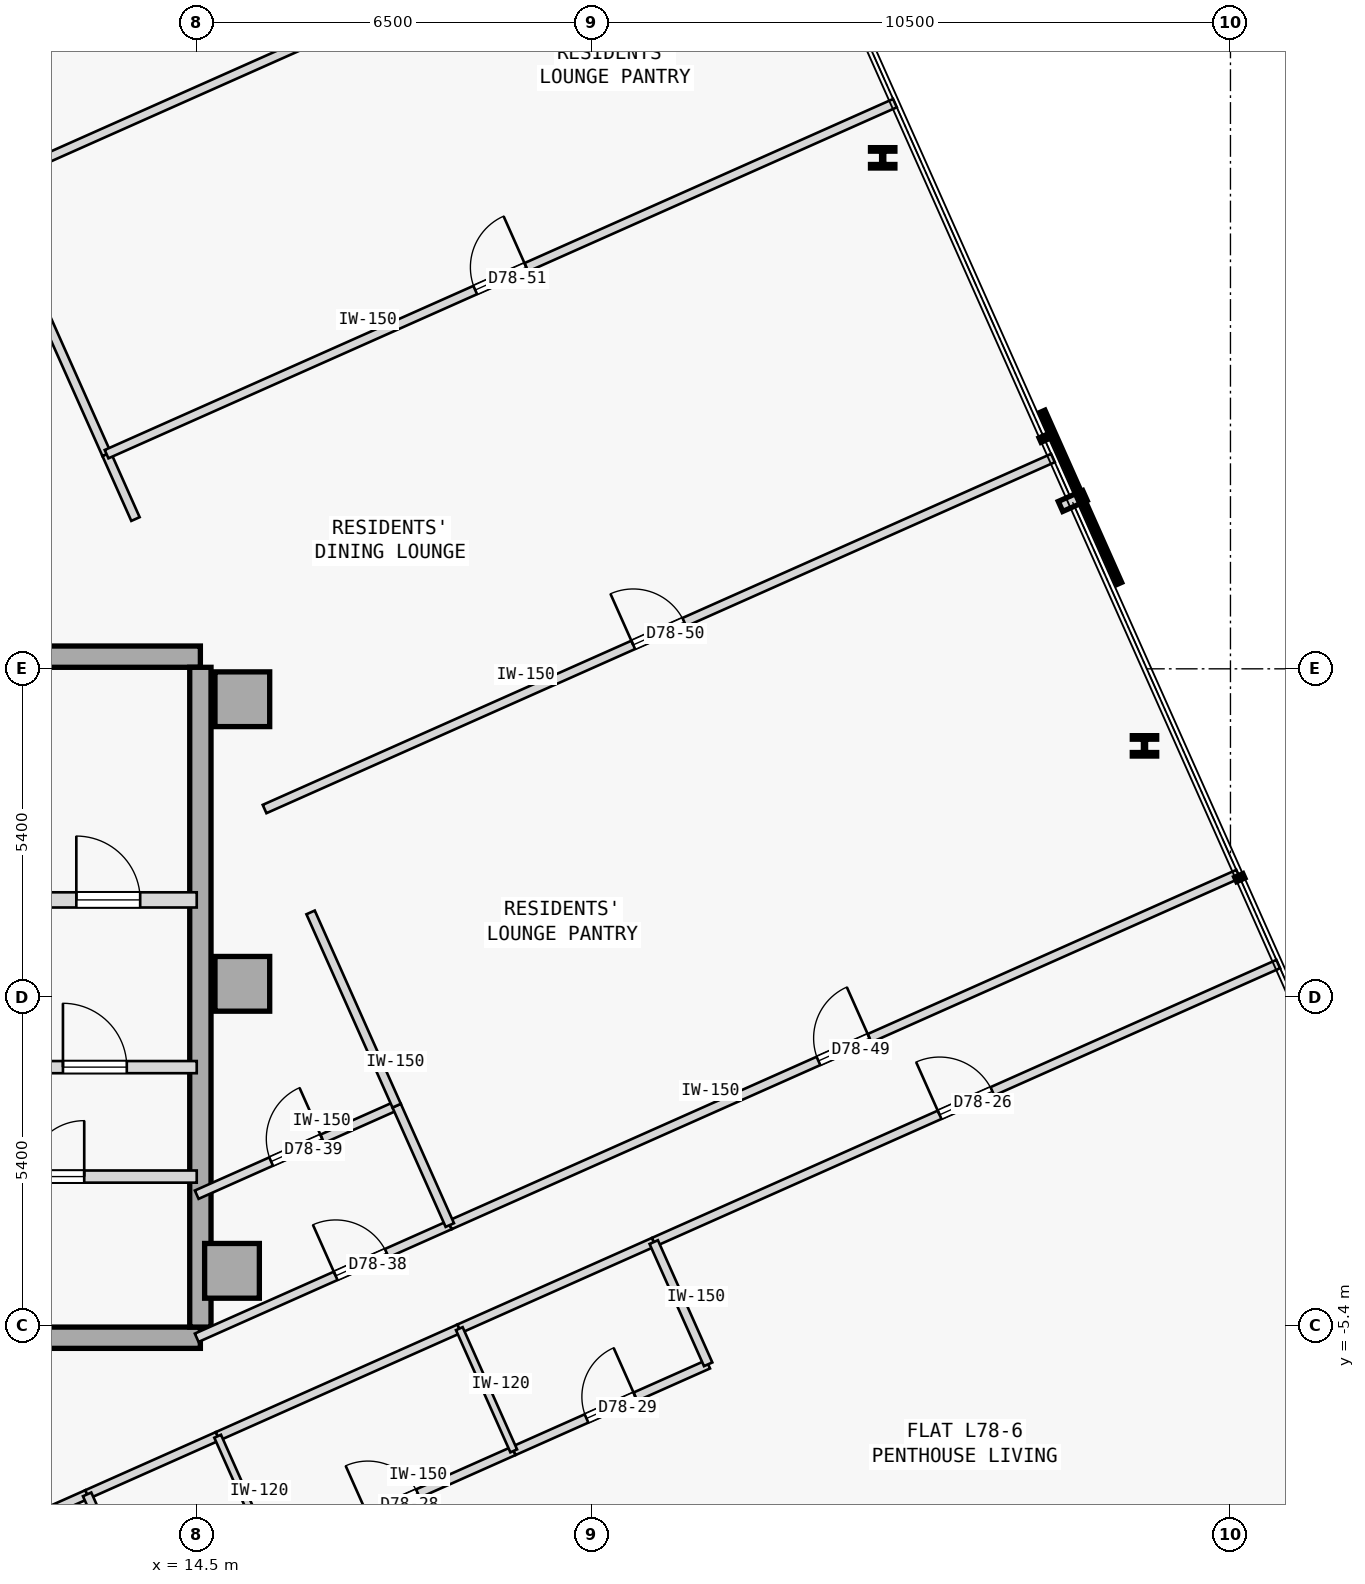
"""IFC4 building model, lengths in metres.
Left out: names, types, materials, properties, quantities, classifications, styles, units other than length and angle.
Written with IfcOpenShell. Run it as: python <this file> out.ifc"""

import sys

from ifc_helpers import new_model, si_unit, direction, frame, frame_2d, origin, origin_2d, place, context, subcontext, project, spatial, rectangle, i_section, extrude, element, fill, save


model = new_model("IFC4")
c1 = context("Model", 3, precision=1e-05, world=origin(), true_north=direction((0.0, 1.0)))
c2 = subcontext(c1, "Body", "Model", "MODEL_VIEW")
j1 = project(units=[si_unit("LENGTHUNIT", "METRE"), si_unit("PLANEANGLEUNIT", "RADIAN")], contexts=[c1])
p1 = place(None, origin())
s1 = spatial("IfcSite", under=j1, at=p1, CompositionType="ELEMENT")
p2 = place(p1, origin())
s2 = spatial("IfcBuilding", under=s1, at=p2, CompositionType="ELEMENT")
p3 = place(p2, frame((0.0, 0.0, 291.95)))
s3 = spatial("IfcBuildingStorey", under=s2, at=p3, CompositionType="ELEMENT", Elevation=291.95)
for number, where, z_axis, x_axis in (
    (1, (15.25, 4.9, 0.0), (0.0, 0.0, 1.0), (1.0, 0.0, 0.0)),
    (2, (15.25, 0.22, 0.0), (0.0, 0.0, 1.0), (1.0, 0.0, 0.0)),
    (3, (15.08, -4.5, 0.0), (0.0, 0.0, 1.0), (1.0, 0.0, 0.0)),
):
    element("IfcColumn", number, at=place(p3, frame(where, z_axis=z_axis, x_axis=x_axis)), inside=s3, PredefinedType="COLUMN", context=c2, shape_type="SweptSolid", body=[
        extrude(rectangle(XDim=0.9, YDim=0.9, at=origin_2d()), origin(), (0.0, 0.0, 1.0), 3.35),
    ])
p4 = place(p3, frame((3.15, 5.6, 0.0), z_axis=(0.0, 0.0, 1.0), x_axis=(1.0, 0.0, 0.0)))
e4 = element("IfcWall", 4, at=p4, inside=s3, PredefinedType="SHEAR", context=c2, shape_type="SweptSolid", body=[
    extrude(rectangle(XDim=11.41, YDim=0.35, at=frame_2d((5.705, 0.0))), origin(), (0.0, 0.0, 1.0), 3.125),
])
p5 = place(p3, frame((3.7, -5.6, 0.0), z_axis=(0.0, 0.0, 1.0), x_axis=(1.0, 0.0, 0.0)))
e5 = element("IfcWall", 5, at=p5, inside=s3, PredefinedType="SHEAR", context=c2, shape_type="SweptSolid", body=[
    extrude(rectangle(XDim=10.86, YDim=0.35, at=frame_2d((5.43, 0.0))), origin(), (0.0, 0.0, 1.0), 3.125),
])
p6 = place(p3, frame((14.56, -5.425, 0.0), z_axis=(0.0, 0.0, 1.0), x_axis=(0.0, 1.0, 0.0)))
e6 = element("IfcWall", 6, at=p6, inside=s3, PredefinedType="SHEAR", context=c2, shape_type="SweptSolid", body=[
    extrude(rectangle(XDim=10.85, YDim=0.35, at=frame_2d((5.425, 0.0))), origin(), (0.0, 0.0, 1.0), 3.125),
])
for number, where, z_axis, x_axis in (
    (7, (30.086, 4.133, 0.0), (0.0, 0.0, 1.0), (1.0, 0.0, 0.0)),
    (8, (25.781, 13.803, 0.0), (0.0, 0.0, 1.0), (1.0, 0.0, 0.0)),
):
    element("IfcColumn", number, at=place(p3, frame(where, z_axis=z_axis, x_axis=x_axis)), inside=s3, PredefinedType="COLUMN", context=c2, shape_type="SweptSolid", body=[
        extrude(i_section(OverallWidth=0.401, OverallDepth=0.335, WebThickness=0.036, FlangeThickness=0.058, FilletRadius=0.015, at=origin_2d()), origin(), (0.0, 0.0, 1.0), 3.35),
    ])
p7 = place(p3, frame((10.9, 1.6, 0.0), z_axis=(0.0, 0.0, 1.0), x_axis=(1.0, 0.0, 0.0)))
e9 = element("IfcWall", 9, at=p7, inside=s3, PredefinedType="STANDARD", context=c2, shape_type="SweptSolid", body=[
    extrude(rectangle(XDim=3.6, YDim=0.25, at=frame_2d((1.8, 0.0))), origin(), (0.0, 0.0, 1.0), 3.125),
])
p8 = place(p7, frame((1.62, 0.0, 0.0)))
e10 = element("IfcOpeningElement", 10, at=p8, cuts=e9, PredefinedType="OPENING", context=c2, shape_type="SweptSolid", body=[
    extrude(rectangle(XDim=1.05, YDim=2.15, at=frame_2d((0.525, 1.075))), frame((0.0, 0.135, 0.0), z_axis=(0.0, -1.0, 0.0), x_axis=(1.0, 0.0, 0.0)), (0.0, 0.0, 1.0), 0.27),
])
p9 = place(p3, frame((11.55, -1.15, 0.0), z_axis=(0.0, 0.0, 1.0), x_axis=(1.0, 0.0, 0.0)))
e11 = element("IfcWall", 11, at=p9, inside=s3, PredefinedType="STANDARD", context=c2, shape_type="SweptSolid", body=[
    extrude(rectangle(XDim=2.95, YDim=0.2, at=frame_2d((1.475, 0.0))), origin(), (0.0, 0.0, 1.0), 3.125),
])
p10 = place(p9, frame((0.75, 0.0, 0.0)))
e12 = element("IfcOpeningElement", 12, at=p10, cuts=e11, PredefinedType="OPENING", context=c2, shape_type="SweptSolid", body=[
    extrude(rectangle(XDim=1.05, YDim=2.18, at=frame_2d((0.525, 1.09))), frame((0.0, 0.11, 0.0), z_axis=(0.0, -1.0, 0.0), x_axis=(1.0, 0.0, 0.0)), (0.0, 0.0, 1.0), 0.22),
])
p11 = place(p3, frame((3.7, -2.95, 0.0), z_axis=(0.0, 0.0, 1.0), x_axis=(1.0, 0.0, 0.0)))
e13 = element("IfcWall", 13, at=p11, inside=s3, PredefinedType="STANDARD", context=c2, shape_type="SweptSolid", body=[
    extrude(rectangle(XDim=10.8, YDim=0.2, at=frame_2d((5.4, 0.0))), origin(), (0.0, 0.0, 1.0), 3.125),
])
p12 = place(p11, frame((0.53, 0.0, 0.0)))
e14 = element("IfcOpeningElement", 14, at=p12, cuts=e13, PredefinedType="OPENING", context=c2, shape_type="SweptSolid", body=[
    extrude(rectangle(XDim=1.1, YDim=2.15, at=frame_2d((0.55, 1.075))), frame((0.0, 0.11, 0.0), z_axis=(0.0, -1.0, 0.0), x_axis=(1.0, 0.0, 0.0)), (0.0, 0.0, 1.0), 0.22),
])
p13 = place(p11, frame((3.71, 0.0, 0.0)))
e15 = element("IfcOpeningElement", 15, at=p13, cuts=e13, PredefinedType="OPENING", context=c2, shape_type="SweptSolid", body=[
    extrude(rectangle(XDim=0.92, YDim=2.15, at=frame_2d((0.46, 1.075))), frame((0.0, 0.11, 0.0), z_axis=(0.0, -1.0, 0.0), x_axis=(1.0, 0.0, 0.0)), (0.0, 0.0, 1.0), 0.22),
])
p14 = place(p11, frame((8.03, 0.0, 0.0)))
e16 = element("IfcOpeningElement", 16, at=p14, cuts=e13, PredefinedType="OPENING", context=c2, shape_type="SweptSolid", body=[
    extrude(rectangle(XDim=0.92, YDim=2.15, at=frame_2d((0.46, 1.075))), frame((0.0, 0.11, 0.0), z_axis=(0.0, -1.0, 0.0), x_axis=(1.0, 0.0, 0.0)), (0.0, 0.0, 1.0), 0.22),
])
p15 = place(p3, frame((7.204, -10.622, 0.0), z_axis=(0.0, 0.0, 1.0), x_axis=(0.913545172627, 0.406737283231, 0.0)))
e17 = element("IfcWall", 17, at=p15, inside=s3, PredefinedType="PARTITIONING", context=c2, shape_type="SweptSolid", body=[
    extrude(rectangle(XDim=6.014, YDim=0.15, at=frame_2d((3.007, 0.0))), origin(), (0.0, 0.0, 1.0), 3.125),
])
p16 = place(p3, frame((22.016, -4.027, 0.0), z_axis=(0.0, 0.0, 1.0), x_axis=(0.913548968583, 0.406728757282, 0.0)))
e18 = element("IfcWall", 18, at=p16, inside=s3, PredefinedType="PARTITIONING", context=c2, shape_type="SweptSolid", body=[
    extrude(rectangle(XDim=11.242, YDim=0.15, at=frame_2d((5.621, 0.0))), origin(), (0.0, 0.0, 1.0), 3.125),
])
p17 = place(p16, frame((5.146, 0.0, 0.0)))
e19 = element("IfcOpeningElement", 19, at=p17, cuts=e18, PredefinedType="OPENING", context=c2, shape_type="SweptSolid", body=[
    extrude(rectangle(XDim=0.95, YDim=2.15, at=frame_2d((0.475, 1.075))), frame((0.0, 0.085, 0.0), z_axis=(0.0, -1.0, 0.0), x_axis=(1.0, 0.0, 0.0)), (0.0, 0.0, 1.0), 0.17),
])
p18 = place(p3, frame((12.698, -8.176, 0.0), z_axis=(0.0, 0.0, 1.0), x_axis=(0.913558622212, 0.406707073682, 0.0)))
e20 = element("IfcWall", 20, at=p18, inside=s3, PredefinedType="PARTITIONING", context=c2, shape_type="SweptSolid", body=[
    extrude(rectangle(XDim=2.35, YDim=0.15, at=frame_2d((1.175, 0.0))), origin(), (0.0, 0.0, 1.0), 3.125),
])
p19 = place(p3, frame((14.844, -7.22, 0.0), z_axis=(0.0, 0.0, 1.0), x_axis=(0.913524337797, 0.406784075711, 0.0)))
e21 = element("IfcWall", 21, at=p19, inside=s3, PredefinedType="PARTITIONING", context=c2, shape_type="SweptSolid", body=[
    extrude(rectangle(XDim=4.35, YDim=0.15, at=frame_2d((2.175, 0.0))), origin(), (0.0, 0.0, 1.0), 3.125),
])
p20 = place(p3, frame((18.818, -5.451, 0.0), z_axis=(0.0, 0.0, 1.0), x_axis=(0.913538066796, 0.406753242783, 0.0)))
e22 = element("IfcWall", 22, at=p20, inside=s3, PredefinedType="PARTITIONING", context=c2, shape_type="SweptSolid", body=[
    extrude(rectangle(XDim=3.5, YDim=0.15, at=frame_2d((1.75, 0.0))), origin(), (0.0, 0.0, 1.0), 3.125),
])
p21 = place(p3, frame((14.5, -5.6, 0.0), z_axis=(0.0, 0.0, 1.0), x_axis=(0.913550607208, 0.406725076766, 0.0)))
e23 = element("IfcWall", 23, at=p21, inside=s3, PredefinedType="PARTITIONING", context=c2, shape_type="SweptSolid", body=[
    extrude(rectangle(XDim=4.556, YDim=0.15, at=frame_2d((2.278, 0.0))), origin(), (0.0, 0.0, 1.0), 3.125),
])
p22 = place(p21, frame((2.501, 0.0, 0.0)))
e24 = element("IfcOpeningElement", 24, at=p22, cuts=e23, PredefinedType="OPENING", context=c2, shape_type="SweptSolid", body=[
    extrude(rectangle(XDim=0.92, YDim=2.15, at=frame_2d((0.46, 1.075))), frame((0.0, 0.085, 0.0), z_axis=(0.0, -1.0, 0.0), x_axis=(1.0, 0.0, 0.0)), (0.0, 0.0, 1.0), 0.17),
])
p23 = place(p3, frame((18.662, -3.747, 0.0), z_axis=(0.0, 0.0, 1.0), x_axis=(0.913544622417, 0.406738519018, 0.0)))
e25 = element("IfcWall", 25, at=p23, inside=s3, PredefinedType="PARTITIONING", context=c2, shape_type="SweptSolid", body=[
    extrude(rectangle(XDim=14.192, YDim=0.15, at=frame_2d((7.096, 0.0))), origin(), (0.0, 0.0, 1.0), 3.125),
])
p24 = place(p23, frame((6.636, 0.0, 0.0)))
e26 = element("IfcOpeningElement", 26, at=p24, cuts=e25, PredefinedType="OPENING", context=c2, shape_type="SweptSolid", body=[
    extrude(rectangle(XDim=0.92, YDim=2.15, at=frame_2d((0.46, 1.075))), frame((0.0, 0.085, 0.0), z_axis=(0.0, -1.0, 0.0), x_axis=(1.0, 0.0, 0.0)), (0.0, 0.0, 1.0), 0.17),
])
p25 = place(p3, frame((13.592, -10.186, 0.0), z_axis=(0.0, 0.0, 1.0), x_axis=(-0.406725294076, 0.913550510459, 0.0)))
e27 = element("IfcWall", 27, at=p25, inside=s3, PredefinedType="PARTITIONING", context=c2, shape_type="SweptSolid", body=[
    extrude(rectangle(XDim=2.2, YDim=0.15, at=frame_2d((1.1, 0.0))), origin(), (0.0, 0.0, 1.0), 3.125),
])
p26 = place(p3, frame((15.739, -9.23, 0.0), z_axis=(0.0, 0.0, 1.0), x_axis=(0.913545193015, 0.406737237438, 0.0)))
e28 = element("IfcWall", 28, at=p26, inside=s3, PredefinedType="PARTITIONING", context=c2, shape_type="SweptSolid", body=[
    extrude(rectangle(XDim=4.35, YDim=0.15, at=frame_2d((2.175, 0.0))), origin(), (0.0, 0.0, 1.0), 3.125),
])
p27 = place(p26, frame((1.725, 0.0, 0.0)))
e29 = element("IfcOpeningElement", 29, at=p27, cuts=e28, PredefinedType="OPENING", context=c2, shape_type="SweptSolid", body=[
    extrude(rectangle(XDim=0.9, YDim=2.15, at=frame_2d((0.45, 1.075))), frame((0.0, 0.085, 0.0), z_axis=(0.0, -1.0, 0.0), x_axis=(1.0, 0.0, 0.0)), (0.0, 0.0, 1.0), 0.17),
])
p28 = place(p3, frame((19.713, -7.461, 0.0), z_axis=(0.0, 0.0, 1.0), x_axis=(0.913549606868, 0.406727323635, 0.0)))
e30 = element("IfcWall", 30, at=p28, inside=s3, PredefinedType="PARTITIONING", context=c2, shape_type="SweptSolid", body=[
    extrude(rectangle(XDim=3.5, YDim=0.15, at=frame_2d((1.75, 0.0))), origin(), (0.0, 0.0, 1.0), 3.125),
])
p29 = place(p28, frame((1.31, 0.0, 0.0)))
e31 = element("IfcOpeningElement", 31, at=p29, cuts=e30, PredefinedType="OPENING", context=c2, shape_type="SweptSolid", body=[
    extrude(rectangle(XDim=0.88, YDim=2.15, at=frame_2d((0.44, 1.075))), frame((0.0, 0.085, 0.0), z_axis=(0.0, -1.0, 0.0), x_axis=(1.0, 0.0, 0.0)), (0.0, 0.0, 1.0), 0.17),
])
p30 = place(p3, frame((22.911, -6.037, 0.0), z_axis=(0.0, 0.0, 1.0), x_axis=(-0.40677666873, 0.913527636022, 0.0)))
e32 = element("IfcWall", 32, at=p30, inside=s3, PredefinedType="PARTITIONING", context=c2, shape_type="SweptSolid", body=[
    extrude(rectangle(XDim=2.2, YDim=0.15, at=frame_2d((1.1, 0.0))), origin(), (0.0, 0.0, 1.0), 3.125),
])
p31 = place(p3, frame((15.739, -9.23, 0.0), z_axis=(0.0, 0.0, 1.0), x_axis=(-0.406725294076, 0.913550510459, 0.0)))
e33 = element("IfcWall", 33, at=p31, inside=s3, PredefinedType="PARTITIONING", context=c2, shape_type="SweptSolid", body=[
    extrude(rectangle(XDim=2.2, YDim=0.12, at=frame_2d((1.1, 0.0))), origin(), (0.0, 0.0, 1.0), 3.125),
])
p32 = place(p3, frame((19.713, -7.461, 0.0), z_axis=(0.0, 0.0, 1.0), x_axis=(-0.406684063321, 0.913568865845, 0.0)))
e34 = element("IfcWall", 34, at=p32, inside=s3, PredefinedType="PARTITIONING", context=c2, shape_type="SweptSolid", body=[
    extrude(rectangle(XDim=2.2, YDim=0.12, at=frame_2d((1.1, 0.0))), origin(), (0.0, 0.0, 1.0), 3.125),
])
p33 = place(p3, frame((14.5, -3.248, 0.0), z_axis=(0.0, 0.0, 1.0), x_axis=(0.913542803573, 0.40674260416, 0.0)))
e35 = element("IfcWall", 35, at=p33, inside=s3, PredefinedType="PARTITIONING", context=c2, shape_type="SweptSolid", body=[
    extrude(rectangle(XDim=3.599, YDim=0.15, at=frame_2d((1.8, 0.0))), origin(), (0.0, 0.0, 1.0), 3.125),
])
p34 = place(p33, frame((1.34, 0.0, 0.0)))
e36 = element("IfcOpeningElement", 36, at=p34, cuts=e35, PredefinedType="OPENING", context=c2, shape_type="SweptSolid", body=[
    extrude(rectangle(XDim=0.92, YDim=2.15, at=frame_2d((0.46, 1.075))), frame((0.0, 0.085, 0.0), z_axis=(0.0, -1.0, 0.0), x_axis=(1.0, 0.0, 0.0)), (0.0, 0.0, 1.0), 0.17),
])
p35 = place(p3, frame((18.662, -3.747, 0.0), z_axis=(0.0, 0.0, 1.0), x_axis=(-0.406686481677, 0.913567789286, 0.0)))
e37 = element("IfcWall", 37, at=p35, inside=s3, PredefinedType="PARTITIONING", context=c2, shape_type="SweptSolid", body=[
    extrude(rectangle(XDim=2.149, YDim=0.15, at=frame_2d((1.075, 0.0))), origin(), (0.0, 0.0, 1.0), 3.125),
])
p36 = place(p3, frame((17.788, -1.784, 0.0), z_axis=(0.0, 0.0, 1.0), x_axis=(-0.40673740295, 0.913545119324, 0.0)))
e38 = element("IfcWall", 38, at=p36, inside=s3, PredefinedType="PARTITIONING", context=c2, shape_type="SweptSolid", body=[
    extrude(rectangle(XDim=3.479, YDim=0.15, at=frame_2d((1.74, 0.0))), origin(), (0.0, 0.0, 1.0), 3.125),
])
p37 = place(p3, frame((13.493, 7.863, 0.0), z_axis=(0.0, 0.0, 1.0), x_axis=(-0.406720145117, 0.913552802829, 0.0)))
e39 = element("IfcWall", 39, at=p37, inside=s3, PredefinedType="PARTITIONING", context=c2, shape_type="SweptSolid", body=[
    extrude(rectangle(XDim=1.168, YDim=0.15, at=frame_2d((0.584, 0.0))), origin(), (0.0, 0.0, 1.0), 3.125),
])
p38 = place(p3, frame((13.018, 8.93, 0.0), z_axis=(0.0, 0.0, 1.0), x_axis=(-0.406768056625, 0.913531470782, 0.0)))
e40 = element("IfcWall", 40, at=p38, inside=s3, PredefinedType="PARTITIONING", context=c2, shape_type="SweptSolid", body=[
    extrude(rectangle(XDim=2.842, YDim=0.15, at=frame_2d((1.421, 0.0))), origin(), (0.0, 0.0, 1.0), 3.125),
])
p39 = place(p3, frame((15.616, 3.094, 0.0), z_axis=(0.0, 0.0, 1.0), x_axis=(0.913551014388, 0.406724162191, 0.0)))
e41 = element("IfcWall", 41, at=p39, inside=s3, PredefinedType="PARTITIONING", context=c2, shape_type="SweptSolid", body=[
    extrude(rectangle(XDim=14.192, YDim=0.15, at=frame_2d((7.096, 0.0))), origin(), (0.0, 0.0, 1.0), 3.125),
])
p40 = place(p39, frame((6.636, 0.0, 0.0)))
e42 = element("IfcOpeningElement", 42, at=p40, cuts=e41, PredefinedType="OPENING", context=c2, shape_type="SweptSolid", body=[
    extrude(rectangle(XDim=0.92, YDim=2.15, at=frame_2d((0.46, 1.075))), frame((0.0, 0.085, 0.0), z_axis=(0.0, -1.0, 0.0), x_axis=(1.0, 0.0, 0.0)), (0.0, 0.0, 1.0), 0.17),
])
p41 = place(p3, frame((13.018, 8.93, 0.0), z_axis=(0.0, 0.0, 1.0), x_axis=(0.913551014388, 0.406724162191, 0.0)))
e43 = element("IfcWall", 43, at=p41, inside=s3, PredefinedType="PARTITIONING", context=c2, shape_type="SweptSolid", body=[
    extrude(rectangle(XDim=14.192, YDim=0.15, at=frame_2d((7.096, 0.0))), origin(), (0.0, 0.0, 1.0), 3.125),
])
p42 = place(p41, frame((6.636, 0.0, 0.0)))
e44 = element("IfcOpeningElement", 44, at=p42, cuts=e43, PredefinedType="OPENING", context=c2, shape_type="SweptSolid", body=[
    extrude(rectangle(XDim=0.92, YDim=2.15, at=frame_2d((0.46, 1.075))), frame((0.0, 0.085, 0.0), z_axis=(0.0, -1.0, 0.0), x_axis=(1.0, 0.0, 0.0)), (0.0, 0.0, 1.0), 0.17),
])
p43 = place(p3, frame((11.046, 13.357, 0.0), z_axis=(0.0, 0.0, 1.0), x_axis=(0.913553860075, 0.406717770379, 0.0)))
e45 = element("IfcWall", 45, at=p43, inside=s3, PredefinedType="PARTITIONING", context=c2, shape_type="SweptSolid", body=[
    extrude(rectangle(XDim=14.192, YDim=0.15, at=frame_2d((7.096, 0.0))), origin(), (0.0, 0.0, 1.0), 3.125),
])
p44 = place(p8, origin())
e46 = element("IfcDoor", 46, at=p44, inside=s3, OperationType="SINGLE_SWING_LEFT", PredefinedType="DOOR", context=c2, shape_type="SweptSolid", body=[
    extrude(rectangle(XDim=1.05, YDim=2.15, at=frame_2d((0.525, 1.075))), frame((0.0, 0.025, 0.0), z_axis=(0.0, -1.0, 0.0), x_axis=(1.0, 0.0, 0.0)), (0.0, 0.0, 1.0), 0.05),
])
fill(e10, e46)
p45 = place(p10, origin())
e47 = element("IfcDoor", 47, at=p45, inside=s3, OperationType="SINGLE_SWING_LEFT", PredefinedType="DOOR", context=c2, shape_type="SweptSolid", body=[
    extrude(rectangle(XDim=1.05, YDim=2.18, at=frame_2d((0.525, 1.09))), frame((0.0, 0.025, 0.0), z_axis=(0.0, -1.0, 0.0), x_axis=(1.0, 0.0, 0.0)), (0.0, 0.0, 1.0), 0.05),
])
fill(e12, e47)
p46 = place(p14, origin())
e48 = element("IfcDoor", 48, at=p46, inside=s3, OperationType="SINGLE_SWING_RIGHT", PredefinedType="DOOR", context=c2, shape_type="SweptSolid", body=[
    extrude(rectangle(XDim=0.92, YDim=2.15, at=frame_2d((0.46, 1.075))), frame((0.0, 0.025, 0.0), z_axis=(0.0, -1.0, 0.0), x_axis=(1.0, 0.0, 0.0)), (0.0, 0.0, 1.0), 0.05),
])
fill(e16, e48)
p47 = place(p17, origin())
e49 = element("IfcDoor", 49, at=p47, inside=s3, OperationType="SINGLE_SWING_LEFT", PredefinedType="DOOR", context=c2, shape_type="SweptSolid", body=[
    extrude(rectangle(XDim=0.95, YDim=2.15, at=frame_2d((0.475, 1.075))), frame((0.0, 0.025, 0.0), z_axis=(0.0, -1.0, 0.0), x_axis=(1.0, 0.0, 0.0)), (0.0, 0.0, 1.0), 0.05),
])
fill(e19, e49)
p48 = place(p27, origin())
e50 = element("IfcDoor", 50, at=p48, inside=s3, OperationType="SINGLE_SWING_LEFT", PredefinedType="DOOR", context=c2, shape_type="SweptSolid", body=[
    extrude(rectangle(XDim=0.9, YDim=2.15, at=frame_2d((0.45, 1.075))), frame((0.0, 0.025, 0.0), z_axis=(0.0, -1.0, 0.0), x_axis=(1.0, 0.0, 0.0)), (0.0, 0.0, 1.0), 0.05),
])
fill(e29, e50)
p49 = place(p29, origin())
e51 = element("IfcDoor", 51, at=p49, inside=s3, OperationType="SINGLE_SWING_RIGHT", PredefinedType="DOOR", context=c2, shape_type="SweptSolid", body=[
    extrude(rectangle(XDim=0.88, YDim=2.15, at=frame_2d((0.44, 1.075))), frame((0.0, 0.025, 0.0), z_axis=(0.0, -1.0, 0.0), x_axis=(1.0, 0.0, 0.0)), (0.0, 0.0, 1.0), 0.05),
])
fill(e31, e51)
p50 = place(p22, origin())
e52 = element("IfcDoor", 52, at=p50, inside=s3, OperationType="SINGLE_SWING_LEFT", PredefinedType="DOOR", context=c2, shape_type="SweptSolid", body=[
    extrude(rectangle(XDim=0.92, YDim=2.15, at=frame_2d((0.46, 1.075))), frame((0.0, 0.025, 0.0), z_axis=(0.0, -1.0, 0.0), x_axis=(1.0, 0.0, 0.0)), (0.0, 0.0, 1.0), 0.05),
])
fill(e24, e52)
p51 = place(p34, origin())
e53 = element("IfcDoor", 53, at=p51, inside=s3, OperationType="SINGLE_SWING_RIGHT", PredefinedType="DOOR", context=c2, shape_type="SweptSolid", body=[
    extrude(rectangle(XDim=0.92, YDim=2.15, at=frame_2d((0.46, 1.075))), frame((0.0, 0.025, 0.0), z_axis=(0.0, -1.0, 0.0), x_axis=(1.0, 0.0, 0.0)), (0.0, 0.0, 1.0), 0.05),
])
fill(e36, e53)
p52 = place(p24, origin())
e54 = element("IfcDoor", 54, at=p52, inside=s3, OperationType="SINGLE_SWING_RIGHT", PredefinedType="DOOR", context=c2, shape_type="SweptSolid", body=[
    extrude(rectangle(XDim=0.92, YDim=2.15, at=frame_2d((0.46, 1.075))), frame((0.0, 0.025, 0.0), z_axis=(0.0, -1.0, 0.0), x_axis=(1.0, 0.0, 0.0)), (0.0, 0.0, 1.0), 0.05),
])
fill(e26, e54)
p53 = place(p40, origin())
e55 = element("IfcDoor", 55, at=p53, inside=s3, OperationType="SINGLE_SWING_LEFT", PredefinedType="DOOR", context=c2, shape_type="SweptSolid", body=[
    extrude(rectangle(XDim=0.92, YDim=2.15, at=frame_2d((0.46, 1.075))), frame((0.0, 0.025, 0.0), z_axis=(0.0, -1.0, 0.0), x_axis=(1.0, 0.0, 0.0)), (0.0, 0.0, 1.0), 0.05),
])
fill(e42, e55)
p54 = place(p42, origin())
e56 = element("IfcDoor", 56, at=p54, inside=s3, OperationType="SINGLE_SWING_RIGHT", PredefinedType="DOOR", context=c2, shape_type="SweptSolid", body=[
    extrude(rectangle(XDim=0.92, YDim=2.15, at=frame_2d((0.46, 1.075))), frame((0.0, 0.025, 0.0), z_axis=(0.0, -1.0, 0.0), x_axis=(1.0, 0.0, 0.0)), (0.0, 0.0, 1.0), 0.05),
])
fill(e44, e56)
save(model, sys.argv[1])
